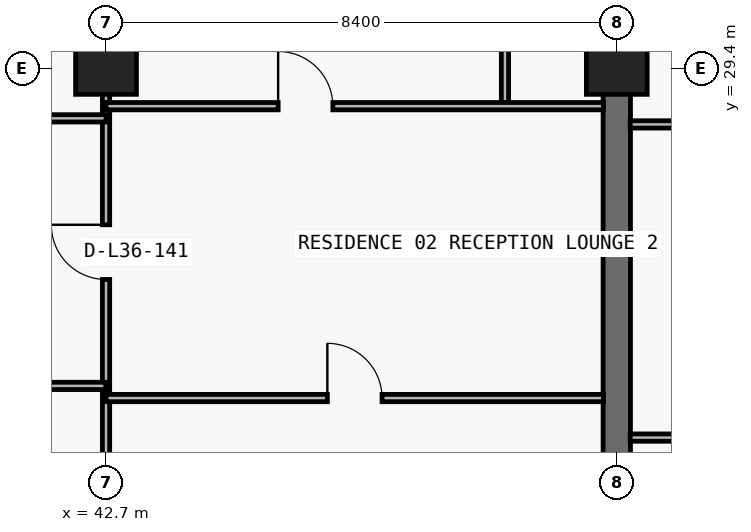
"""IFC4 building model, lengths in metres.
Left out: names, types, materials, properties, quantities, classifications, styles, units other than length and angle.
Written with IfcOpenShell. Run it as: python <this file> out.ifc"""

import sys

from ifc_helpers import new_model, si_unit, direction, frame, frame_2d, origin, origin_2d, place, context, subcontext, project, spatial, rectangle, extrude, element, fill, save


model = new_model("IFC4")
c1 = context("Model", 3, precision=1e-05, world=origin(), true_north=direction((0.0, 1.0)))
c2 = subcontext(c1, "Body", "Model", "MODEL_VIEW")
j1 = project(units=[si_unit("LENGTHUNIT", "METRE"), si_unit("PLANEANGLEUNIT", "RADIAN")], contexts=[c1])
p1 = place(None, origin())
s1 = spatial("IfcSite", under=j1, at=p1, CompositionType="ELEMENT")
p2 = place(p1, origin())
s2 = spatial("IfcBuilding", under=s1, at=p2, CompositionType="ELEMENT")
p3 = place(p2, frame((0.0, 0.0, 132.3)))
s3 = spatial("IfcBuildingStorey", under=s2, at=p3, CompositionType="ELEMENT", Elevation=132.3)
for number, where, z_axis, x_axis in (
    (1, (42.7, 29.4, 0.0), (0.0, 0.0, 1.0), (1.0, 0.0, 0.0)),
    (2, (51.1, 29.4, 0.0), (0.0, 0.0, 1.0), (1.0, 0.0, 0.0)),
):
    element("IfcColumn", number, at=place(p3, frame(where, z_axis=z_axis, x_axis=x_axis)), inside=s3, PredefinedType="COLUMN", context=c2, shape_type="SweptSolid", body=[
        extrude(rectangle(XDim=1.0, YDim=0.85, at=origin_2d()), origin(), (0.0, 0.0, 1.0), 3.05),
    ])
p4 = place(p3, frame((51.1, 20.8, 0.0), z_axis=(0.0, 0.0, 1.0), x_axis=(0.0, 1.0, 0.0)))
e3 = element("IfcWall", 3, at=p4, inside=s3, PredefinedType="SHEAR", context=c2, shape_type="SweptSolid", body=[
    extrude(rectangle(XDim=8.6, YDim=0.45, at=frame_2d((4.3, 0.0))), origin(), (0.0, 0.0, 1.0), 3.05),
])
p5 = place(p3, frame((42.7, 8.84, 0.0), z_axis=(0.0, 0.0, 1.0), x_axis=(0.0, 1.0, 0.0)))
e4 = element("IfcWall", 4, at=p5, inside=s3, PredefinedType="PARTITIONING", context=c2, shape_type="SweptSolid", body=[
    extrude(rectangle(XDim=19.94, YDim=0.12, at=frame_2d((9.97, 0.0))), origin(), (0.0, 0.0, 1.0), 2.174),
])
p6 = place(p5, frame((17.09, 0.0, 0.0)))
e5 = element("IfcOpeningElement", 5, at=p6, cuts=e4, PredefinedType="OPENING", context=c2, shape_type="SweptSolid", body=[
    extrude(rectangle(XDim=0.9, YDim=2.124, at=frame_2d((0.45, 1.062))), frame((0.0, 0.07, 0.0), z_axis=(0.0, -1.0, 0.0), x_axis=(1.0, 0.0, 0.0)), (0.0, 0.0, 1.0), 0.14),
])
p7 = place(p3, frame((42.7, 28.84, 0.0), z_axis=(0.0, 0.0, 1.0), x_axis=(0.0, 1.0, 0.0)))
e6 = element("IfcWall", 6, at=p7, inside=s3, PredefinedType="PARTITIONING", context=c2, shape_type="SweptSolid", body=[
    extrude(rectangle(XDim=5.16, YDim=0.12, at=frame_2d((2.58, 0.0))), origin(), (0.0, 0.0, 1.0), 2.174),
])
p8 = place(p3, frame((49.261, 28.84, 0.0), z_axis=(0.0, 0.0, 1.0), x_axis=(0.0, 1.0, 0.0)))
e7 = element("IfcWall", 7, at=p8, inside=s3, PredefinedType="PARTITIONING", context=c2, shape_type="SweptSolid", body=[
    extrude(rectangle(XDim=5.16, YDim=0.12, at=frame_2d((2.58, 0.0))), origin(), (0.0, 0.0, 1.0), 3.05),
])
p9 = place(p8, frame((2.155, 0.0, 0.0)))
e8 = element("IfcOpeningElement", 8, at=p9, cuts=e7, PredefinedType="OPENING", context=c2, shape_type="SweptSolid", body=[
    extrude(rectangle(XDim=0.85, YDim=2.1, at=frame_2d((0.425, 1.05))), frame((0.0, 0.07, 0.0), z_axis=(0.0, -1.0, 0.0), x_axis=(1.0, 0.0, 0.0)), (0.0, 0.0, 1.0), 0.14),
])
p10 = place(p3, frame((51.1, 29.405, 0.0), z_axis=(0.0, 0.0, 1.0), x_axis=(0.0, 1.0, 0.0)))
e9 = element("IfcWall", 9, at=p10, inside=s3, PredefinedType="PARTITIONING", context=c2, shape_type="SweptSolid", body=[
    extrude(rectangle(XDim=4.595, YDim=0.2, at=frame_2d((2.297, 0.0))), origin(), (0.0, 0.0, 1.0), 2.335),
])
p11 = place(p3, frame((51.32, 23.33, 0.0), z_axis=(0.0, 0.0, 1.0), x_axis=(1.0, 0.0, 0.0)))
e10 = element("IfcWall", 10, at=p11, inside=s3, PredefinedType="PARTITIONING", context=c2, shape_type="SweptSolid", body=[
    extrude(rectangle(XDim=4.566, YDim=0.12, at=frame_2d((2.283, 0.0))), origin(), (0.0, 0.0, 1.0), 3.05),
])
p12 = place(p11, frame((1.414, 0.0, 0.0)))
e11 = element("IfcOpeningElement", 11, at=p12, cuts=e10, PredefinedType="OPENING", context=c2, shape_type="SweptSolid", body=[
    extrude(rectangle(XDim=0.9, YDim=2.15, at=frame_2d((0.45, 1.075))), frame((0.0, 0.07, 0.0), z_axis=(0.0, -1.0, 0.0), x_axis=(1.0, 0.0, 0.0)), (0.0, 0.0, 1.0), 0.14),
])
p13 = place(p3, frame((42.7, 23.98, 0.0), z_axis=(0.0, 0.0, 1.0), x_axis=(1.0, 0.0, 0.0)))
e12 = element("IfcWall", 12, at=p13, inside=s3, PredefinedType="PARTITIONING", context=c2, shape_type="SweptSolid", body=[
    extrude(rectangle(XDim=8.18, YDim=0.12, at=frame_2d((4.09, 0.0))), origin(), (0.0, 0.0, 1.0), 3.05),
])
p14 = place(p13, frame((3.64, 0.0, 0.0)))
e13 = element("IfcOpeningElement", 13, at=p14, cuts=e12, PredefinedType="OPENING", context=c2, shape_type="SweptSolid", body=[
    extrude(rectangle(XDim=0.9, YDim=2.15, at=frame_2d((0.45, 1.075))), frame((0.0, 0.07, 0.0), z_axis=(0.0, -1.0, 0.0), x_axis=(1.0, 0.0, 0.0)), (0.0, 0.0, 1.0), 0.14),
])
p15 = place(p3, frame((35.105, 24.18, 0.0), z_axis=(0.0, 0.0, 1.0), x_axis=(1.0, 0.0, 0.0)))
e14 = element("IfcWall", 14, at=p15, inside=s3, PredefinedType="PARTITIONING", context=c2, shape_type="SweptSolid", body=[
    extrude(rectangle(XDim=7.59, YDim=0.12, at=frame_2d((3.795, 0.0))), origin(), (0.0, 0.0, 1.0), 3.05),
])
p16 = place(p15, frame((3.345, 0.0, 0.0)))
e15 = element("IfcOpeningElement", 15, at=p16, cuts=e14, PredefinedType="OPENING", context=c2, shape_type="SweptSolid", body=[
    extrude(rectangle(XDim=0.9, YDim=2.15, at=frame_2d((0.45, 1.075))), frame((0.0, 0.07, 0.0), z_axis=(0.0, -1.0, 0.0), x_axis=(1.0, 0.0, 0.0)), (0.0, 0.0, 1.0), 0.14),
])
p17 = place(p3, frame((51.32, 28.48, 0.0), z_axis=(0.0, 0.0, 1.0), x_axis=(1.0, 0.0, 0.0)))
e16 = element("IfcWall", 16, at=p17, inside=s3, PredefinedType="PARTITIONING", context=c2, shape_type="SweptSolid", body=[
    extrude(rectangle(XDim=4.566, YDim=0.12, at=frame_2d((2.283, 0.0))), origin(), (0.0, 0.0, 1.0), 3.05),
])
p18 = place(p17, frame((1.833, 0.0, 0.0)))
e17 = element("IfcOpeningElement", 17, at=p18, cuts=e16, PredefinedType="OPENING", context=c2, shape_type="SweptSolid", body=[
    extrude(rectangle(XDim=0.9, YDim=2.15, at=frame_2d((0.45, 1.075))), frame((0.0, 0.07, 0.0), z_axis=(0.0, -1.0, 0.0), x_axis=(1.0, 0.0, 0.0)), (0.0, 0.0, 1.0), 0.14),
])
p19 = place(p3, frame((35.1, 28.58, 0.0), z_axis=(0.0, 0.0, 1.0), x_axis=(1.0, 0.0, 0.0)))
e18 = element("IfcWall", 18, at=p19, inside=s3, PredefinedType="PARTITIONING", context=c2, shape_type="SweptSolid", body=[
    extrude(rectangle(XDim=7.6, YDim=0.12, at=frame_2d((3.8, 0.0))), origin(), (0.0, 0.0, 1.0), 3.05),
])
p20 = place(p19, frame((2.418, 0.0, 0.0)))
e19 = element("IfcOpeningElement", 19, at=p20, cuts=e18, PredefinedType="OPENING", context=c2, shape_type="SweptSolid", body=[
    extrude(rectangle(XDim=0.9, YDim=2.15, at=frame_2d((0.45, 1.075))), frame((0.0, 0.07, 0.0), z_axis=(0.0, -1.0, 0.0), x_axis=(1.0, 0.0, 0.0)), (0.0, 0.0, 1.0), 0.14),
])
p21 = place(p3, frame((42.7, 28.78, 0.0), z_axis=(0.0, 0.0, 1.0), x_axis=(1.0, 0.0, 0.0)))
e20 = element("IfcWall", 20, at=p21, inside=s3, PredefinedType="PARTITIONING", context=c2, shape_type="SweptSolid", body=[
    extrude(rectangle(XDim=8.18, YDim=0.12, at=frame_2d((4.09, 0.0))), origin(), (0.0, 0.0, 1.0), 3.05),
])
p22 = place(p21, frame((2.831, 0.0, 0.0)))
e21 = element("IfcOpeningElement", 21, at=p22, cuts=e20, PredefinedType="OPENING", context=c2, shape_type="SweptSolid", body=[
    extrude(rectangle(XDim=0.9, YDim=2.15, at=frame_2d((0.45, 1.075))), frame((0.0, 0.07, 0.0), z_axis=(0.0, -1.0, 0.0), x_axis=(1.0, 0.0, 0.0)), (0.0, 0.0, 1.0), 0.14),
])
p23 = place(p6, origin())
e22 = element("IfcDoor", 22, at=p23, inside=s3, OperationType="SINGLE_SWING_RIGHT", PredefinedType="DOOR", context=c2, shape_type="SweptSolid", body=[
    extrude(rectangle(XDim=0.9, YDim=2.124, at=frame_2d((0.45, 1.062))), frame((0.0, 0.025, 0.0), z_axis=(0.0, -1.0, 0.0), x_axis=(1.0, 0.0, 0.0)), (0.0, 0.0, 1.0), 0.05),
])
fill(e5, e22)
p24 = place(p22, origin())
e23 = element("IfcDoor", 23, at=p24, inside=s3, OperationType="SINGLE_SWING_LEFT", PredefinedType="DOOR", context=c2, shape_type="SweptSolid", body=[
    extrude(rectangle(XDim=0.9, YDim=2.15, at=frame_2d((0.45, 1.075))), frame((0.0, 0.025, 0.0), z_axis=(0.0, -1.0, 0.0), x_axis=(1.0, 0.0, 0.0)), (0.0, 0.0, 1.0), 0.05),
])
fill(e21, e23)
p25 = place(p14, origin())
e24 = element("IfcDoor", 24, at=p25, inside=s3, OperationType="SINGLE_SWING_LEFT", PredefinedType="DOOR", context=c2, shape_type="SweptSolid", body=[
    extrude(rectangle(XDim=0.9, YDim=2.15, at=frame_2d((0.45, 1.075))), frame((0.0, 0.025, 0.0), z_axis=(0.0, -1.0, 0.0), x_axis=(1.0, 0.0, 0.0)), (0.0, 0.0, 1.0), 0.05),
])
fill(e13, e24)
save(model, sys.argv[1])
